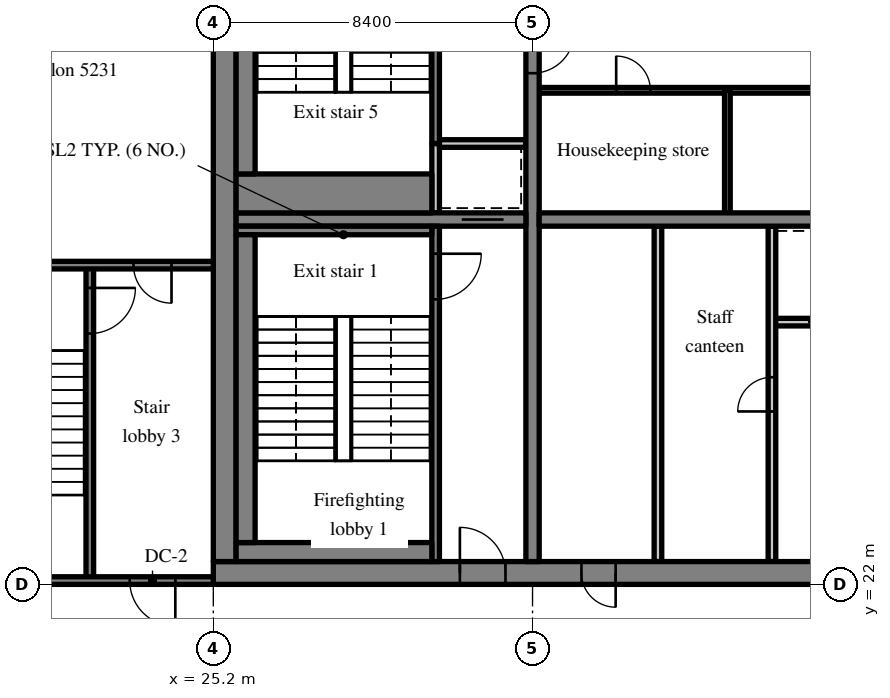
"""IFC4 building model, lengths in metres.
Left out: names, types, materials, properties, quantities, classifications, styles, units other than length and angle.
Written with IfcOpenShell. Run it as: python <this file> out.ifc"""

import sys

from ifc_helpers import new_model, si_unit, direction, frame, frame_2d, origin, place, context, subcontext, project, spatial, rectangle, extrude, source, transform, mapped, element, fill, save


model = new_model("IFC4")
c1 = context("Model", 3, precision=1e-05, world=origin(), true_north=direction((0.0, 1.0)))
c2 = subcontext(c1, "Body", "Model", "MODEL_VIEW")
j1 = project(units=[si_unit("LENGTHUNIT", "METRE"), si_unit("PLANEANGLEUNIT", "RADIAN")], contexts=[c1])
p1 = place(None, origin())
s1 = spatial("IfcSite", under=j1, at=p1, CompositionType="ELEMENT")
p2 = place(p1, origin())
s2 = spatial("IfcBuilding", under=s1, at=p2, CompositionType="ELEMENT")
p3 = place(p2, frame((0.0, 0.0, 217.9)))
s3 = spatial("IfcBuildingStorey", under=s2, at=p3, CompositionType="ELEMENT", Elevation=217.9)
m1 = source(origin(), c2, "Body", "SweptSolid", [
    extrude(rectangle(XDim=50.4, YDim=0.6, at=frame_2d((25.2, 0.0))), origin(), (0.0, 0.0, 1.0), 3.62),
])
p4 = place(p3, frame((25.2, 22.3, 0.0), z_axis=(0.0, 0.0, 1.0), x_axis=(1.0, 0.0, 0.0)))
e1 = element("IfcWall", 1, at=p4, inside=s3, PredefinedType="SHEAR", context=c2, shape_type="MappedRepresentation", body=[
    mapped(m1, transform((0.0, 0.0, 0.0), scale=1.0)),
])
m2 = source(origin(), c2, "Body", "SweptSolid", [
    extrude(rectangle(XDim=1.8, YDim=2.1, at=frame_2d((0.9, 1.05))), frame((0.0, 0.31, 0.0), z_axis=(0.0, -1.0, 0.0), x_axis=(1.0, 0.0, 0.0)), (0.0, 0.0, 1.0), 0.62),
])
p5 = place(p4, frame((15.9, 0.0, 0.0)))
e2 = element("IfcOpeningElement", 2, at=p5, cuts=e1, PredefinedType="OPENING", context=c2, shape_type="MappedRepresentation", body=[
    mapped(m2, transform((0.0, 0.0, 0.0), scale=1.0)),
])
m3 = source(origin(), c2, "Body", "SweptSolid", [
    extrude(rectangle(XDim=0.9, YDim=2.1, at=frame_2d((0.45, 1.05))), frame((0.0, 0.31, 0.0), z_axis=(0.0, -1.0, 0.0), x_axis=(1.0, 0.0, 0.0)), (0.0, 0.0, 1.0), 0.62),
])
p6 = place(p4, frame((9.687, 0.0, 0.0)))
e3 = element("IfcOpeningElement", 3, at=p6, cuts=e1, PredefinedType="OPENING", context=c2, shape_type="MappedRepresentation", body=[
    mapped(m3, transform((0.0, 0.0, 0.0), scale=1.0)),
])
p7 = place(p4, frame((21.513, 0.0, 0.0)))
e4 = element("IfcOpeningElement", 4, at=p7, cuts=e1, PredefinedType="OPENING", context=c2, shape_type="MappedRepresentation", body=[
    mapped(m3, transform((0.0, 0.0, 0.0), scale=1.0)),
])
p8 = place(p4, frame((32.7, 0.0, 0.0)))
e5 = element("IfcOpeningElement", 5, at=p8, cuts=e1, PredefinedType="OPENING", context=c2, shape_type="MappedRepresentation", body=[
    mapped(m2, transform((0.0, 0.0, 0.0), scale=1.0)),
])
m4 = source(origin(), c2, "Body", "SweptSolid", [
    extrude(rectangle(XDim=1.2, YDim=2.1, at=frame_2d((0.6, 1.05))), frame((0.0, 0.31, 0.0), z_axis=(0.0, -1.0, 0.0), x_axis=(1.0, 0.0, 0.0)), (0.0, 0.0, 1.0), 0.62),
])
p9 = place(p4, frame((6.488, 0.0, 0.0)))
e6 = element("IfcOpeningElement", 6, at=p9, cuts=e1, PredefinedType="OPENING", context=c2, shape_type="MappedRepresentation", body=[
    mapped(m4, transform((0.0, 0.0, 0.0), scale=1.0)),
])
p10 = place(p4, frame((47.925, 0.0, 0.0)))
e7 = element("IfcOpeningElement", 7, at=p10, cuts=e1, PredefinedType="OPENING", context=c2, shape_type="MappedRepresentation", body=[
    mapped(m4, transform((0.0, 0.0, 0.0), scale=1.0)),
])
m5 = source(origin(), c2, "Body", "SweptSolid", [
    extrude(rectangle(XDim=18.8, YDim=0.6, at=frame_2d((9.4, 0.0))), origin(), (0.0, 0.0, 1.0), 3.62),
])
p11 = place(p3, frame((25.5, 22.6, 0.0), z_axis=(0.0, 0.0, 1.0), x_axis=(0.0, 1.0, 0.0)))
e8 = element("IfcWall", 8, at=p11, inside=s3, PredefinedType="SHEAR", context=c2, shape_type="MappedRepresentation", body=[
    mapped(m5, transform((0.0, 0.0, 0.0), scale=1.0)),
])
m6 = source(origin(), c2, "Body", "SweptSolid", [
    extrude(rectangle(XDim=18.8, YDim=0.35, at=frame_2d((9.4, 0.0))), origin(), (0.0, 0.0, 1.0), 3.62),
])
p12 = place(p3, frame((33.6, 22.6, 0.0), z_axis=(0.0, 0.0, 1.0), x_axis=(0.0, 1.0, 0.0)))
e9 = element("IfcWall", 9, at=p12, inside=s3, PredefinedType="SHEAR", context=c2, shape_type="MappedRepresentation", body=[
    mapped(m6, transform((0.0, 0.0, 0.0), scale=1.0)),
])
m7 = source(origin(), c2, "Body", "SweptSolid", [
    extrude(rectangle(XDim=1.1, YDim=2.1, at=frame_2d((0.55, 1.05))), frame((0.0, 0.185, 0.0), z_axis=(0.0, -1.0, 0.0), x_axis=(1.0, 0.0, 0.0)), (0.0, 0.0, 1.0), 0.37),
])
p13 = place(p12, frame((12.85, 0.0, 0.0)))
e10 = element("IfcOpeningElement", 10, at=p13, cuts=e9, PredefinedType="OPENING", context=c2, shape_type="MappedRepresentation", body=[
    mapped(m7, transform((0.0, 0.0, 0.0), scale=1.0)),
])
m8 = source(origin(), c2, "Body", "SweptSolid", [
    extrude(rectangle(XDim=7.625, YDim=0.35, at=frame_2d((3.812, 0.0))), origin(), (0.0, 0.0, 1.0), 3.62),
])
p14 = place(p3, frame((25.8, 31.6, 0.0), z_axis=(0.0, 0.0, 1.0), x_axis=(1.0, 0.0, 0.0)))
e11 = element("IfcWall", 11, at=p14, inside=s3, PredefinedType="SHEAR", context=c2, shape_type="MappedRepresentation", body=[
    mapped(m8, transform((0.0, 0.0, 0.0), scale=1.0)),
])
p15 = place(p14, frame((5.938, 0.0, 0.0)))
e12 = element("IfcOpeningElement", 12, at=p15, cuts=e11, PredefinedType="OPENING", context=c2, shape_type="MappedRepresentation", body=[
    mapped(m7, transform((0.0, 0.0, 0.0), scale=1.0)),
])
m9 = source(origin(), c2, "Body", "SweptSolid", [
    extrude(rectangle(XDim=16.45, YDim=0.35, at=frame_2d((8.225, 0.0))), origin(), (0.0, 0.0, 1.0), 3.62),
])
p16 = place(p3, frame((33.775, 31.6, 0.0), z_axis=(0.0, 0.0, 1.0), x_axis=(1.0, 0.0, 0.0)))
e13 = element("IfcWall", 13, at=p16, inside=s3, PredefinedType="SHEAR", context=c2, shape_type="MappedRepresentation", body=[
    mapped(m9, transform((0.0, 0.0, 0.0), scale=1.0)),
])
m10 = source(origin(), c2, "Body", "SweptSolid", [
    extrude(rectangle(XDim=1.0, YDim=2.1, at=frame_2d((0.5, 1.05))), frame((0.0, 0.185, 0.0), z_axis=(0.0, -1.0, 0.0), x_axis=(1.0, 0.0, 0.0)), (0.0, 0.0, 1.0), 0.37),
])
p17 = place(p16, frame((14.837, 0.0, 0.0)))
e14 = element("IfcOpeningElement", 14, at=p17, cuts=e13, PredefinedType="OPENING", context=c2, shape_type="MappedRepresentation", body=[
    mapped(m10, transform((0.0, 0.0, 0.0), scale=1.0)),
])
m11 = source(origin(), c2, "Body", "SweptSolid", [
    extrude(rectangle(XDim=6.0, YDim=0.2, at=frame_2d((3.0, 0.0))), origin(), (0.0, 0.0, 1.0), 3.62),
])
p18 = place(p3, frame((39.9, 28.9, 0.0), z_axis=(0.0, 0.0, 1.0), x_axis=(1.0, 0.0, 0.0)))
e15 = element("IfcWall", 15, at=p18, inside=s3, PredefinedType="SOLIDWALL", context=c2, shape_type="MappedRepresentation", body=[
    mapped(m11, transform((0.0, 0.0, 0.0), scale=1.0)),
])
m12 = source(origin(), c2, "Body", "SweptSolid", [
    extrude(rectangle(XDim=1.1, YDim=2.1, at=frame_2d((0.55, 1.05))), frame((0.0, 0.11, 0.0), z_axis=(0.0, -1.0, 0.0), x_axis=(1.0, 0.0, 0.0)), (0.0, 0.0, 1.0), 0.22),
])
p19 = place(p18, frame((0.95, 0.0, 0.0)))
e16 = element("IfcOpeningElement", 16, at=p19, cuts=e15, PredefinedType="OPENING", context=c2, shape_type="MappedRepresentation", body=[
    mapped(m12, transform((0.0, 0.0, 0.0), scale=1.0)),
])
p20 = place(p18, frame((3.95, 0.0, 0.0)))
e17 = element("IfcOpeningElement", 17, at=p20, cuts=e15, PredefinedType="OPENING", context=c2, shape_type="MappedRepresentation", body=[
    mapped(m12, transform((0.0, 0.0, 0.0), scale=1.0)),
])
m13 = source(origin(), c2, "Body", "SweptSolid", [
    extrude(rectangle(XDim=8.825, YDim=0.2, at=frame_2d((4.413, 0.0))), origin(), (0.0, 0.0, 1.0), 3.62),
])
p21 = place(p3, frame((39.9, 22.6, 0.0), z_axis=(0.0, 0.0, 1.0), x_axis=(0.0, 1.0, 0.0)))
e18 = element("IfcWall", 18, at=p21, inside=s3, PredefinedType="PARTITIONING", context=c2, shape_type="MappedRepresentation", body=[
    mapped(m13, transform((0.0, 0.0, 0.0), scale=1.0)),
])
m14 = source(origin(), c2, "Body", "SweptSolid", [
    extrude(rectangle(XDim=0.9, YDim=2.1, at=frame_2d((0.45, 1.05))), frame((0.0, 0.11, 0.0), z_axis=(0.0, -1.0, 0.0), x_axis=(1.0, 0.0, 0.0)), (0.0, 0.0, 1.0), 0.22),
])
p22 = place(p21, frame((3.95, 0.0, 0.0)))
e19 = element("IfcOpeningElement", 19, at=p22, cuts=e18, PredefinedType="OPENING", context=c2, shape_type="MappedRepresentation", body=[
    mapped(m14, transform((0.0, 0.0, 0.0), scale=1.0)),
])
p23 = place(p3, frame((36.9, 22.6, 0.0), z_axis=(0.0, 0.0, 1.0), x_axis=(0.0, 1.0, 0.0)))
e20 = element("IfcWall", 20, at=p23, inside=s3, PredefinedType="PARTITIONING", context=c2, shape_type="MappedRepresentation", body=[
    mapped(m13, transform((0.0, 0.0, 0.0), scale=1.0)),
])
m15 = source(origin(), c2, "Body", "SweptSolid", [
    extrude(rectangle(XDim=14.225, YDim=0.15, at=frame_2d((7.113, 0.0))), origin(), (0.0, 0.0, 1.0), 3.62),
])
p24 = place(p3, frame((33.775, 35.0, 0.0), z_axis=(0.0, 0.0, 1.0), x_axis=(1.0, 0.0, 0.0)))
e21 = element("IfcWall", 21, at=p24, inside=s3, PredefinedType="PARTITIONING", context=c2, shape_type="MappedRepresentation", body=[
    mapped(m15, transform((0.0, 0.0, 0.0), scale=1.0)),
])
m16 = source(origin(), c2, "Body", "SweptSolid", [
    extrude(rectangle(XDim=0.9, YDim=2.1, at=frame_2d((0.45, 1.05))), frame((0.0, 0.085, 0.0), z_axis=(0.0, -1.0, 0.0), x_axis=(1.0, 0.0, 0.0)), (0.0, 0.0, 1.0), 0.17),
])
p25 = place(p24, frame((2.026, 0.0, 0.0)))
e22 = element("IfcOpeningElement", 22, at=p25, cuts=e21, PredefinedType="OPENING", context=c2, shape_type="MappedRepresentation", body=[
    mapped(m16, transform((0.0, 0.0, 0.0), scale=1.0)),
])
p26 = place(p24, frame((9.101, 0.0, 0.0)))
e23 = element("IfcOpeningElement", 23, at=p26, cuts=e21, PredefinedType="OPENING", context=c2, shape_type="MappedRepresentation", body=[
    mapped(m16, transform((0.0, 0.0, 0.0), scale=1.0)),
])
m17 = source(origin(), c2, "Body", "SweptSolid", [
    extrude(rectangle(XDim=3.225, YDim=0.15, at=frame_2d((1.613, 0.0))), origin(), (0.0, 0.0, 1.0), 3.62),
])
p27 = place(p3, frame((38.727, 31.775, 0.0), z_axis=(0.0, 0.0, 1.0), x_axis=(0.0, 1.0, 0.0)))
e24 = element("IfcWall", 24, at=p27, inside=s3, PredefinedType="PARTITIONING", context=c2, shape_type="MappedRepresentation", body=[
    mapped(m17, transform((0.0, 0.0, 0.0), scale=1.0)),
])
m18 = source(origin(), c2, "Body", "SweptSolid", [
    extrude(rectangle(XDim=8.825, YDim=0.2, at=frame_2d((4.413, 0.0))), origin(), (0.0, 0.0, 1.0), 3.62),
])
p28 = place(p3, frame((31.05, 22.6, 0.0), z_axis=(0.0, 0.0, 1.0), x_axis=(0.0, 1.0, 0.0)))
e25 = element("IfcWall", 25, at=p28, inside=s3, PredefinedType="SOLIDWALL", context=c2, shape_type="MappedRepresentation", body=[
    mapped(m18, transform((0.0, 0.0, 0.0), scale=1.0)),
])
m19 = source(origin(), c2, "Body", "SweptSolid", [
    extrude(rectangle(XDim=1.2, YDim=2.1, at=frame_2d((0.6, 1.05))), frame((0.0, 0.11, 0.0), z_axis=(0.0, -1.0, 0.0), x_axis=(1.0, 0.0, 0.0)), (0.0, 0.0, 1.0), 0.22),
])
p29 = place(p28, frame((6.9, 0.0, 0.0)))
e26 = element("IfcOpeningElement", 26, at=p29, cuts=e25, PredefinedType="OPENING", context=c2, shape_type="MappedRepresentation", body=[
    mapped(m19, transform((0.0, 0.0, 0.0), scale=1.0)),
])
m20 = source(origin(), c2, "Body", "SweptSolid", [
    extrude(rectangle(XDim=1.825, YDim=0.2, at=frame_2d((0.913, 0.0))), origin(), (0.0, 0.0, 1.0), 3.62),
])
p30 = place(p3, frame((31.05, 31.775, 0.0), z_axis=(0.0, 0.0, 1.0), x_axis=(0.0, 1.0, 0.0)))
e27 = element("IfcWall", 27, at=p30, inside=s3, PredefinedType="SOLIDWALL", context=c2, shape_type="MappedRepresentation", body=[
    mapped(m20, transform((0.0, 0.0, 0.0), scale=1.0)),
])
m21 = source(origin(), c2, "Body", "SweptSolid", [
    extrude(rectangle(XDim=2.275, YDim=0.2, at=frame_2d((1.138, 0.0))), origin(), (0.0, 0.0, 1.0), 3.62),
])
p31 = place(p3, frame((31.15, 33.6, 0.0), z_axis=(0.0, 0.0, 1.0), x_axis=(1.0, 0.0, 0.0)))
e28 = element("IfcWall", 28, at=p31, inside=s3, PredefinedType="SOLIDWALL", context=c2, shape_type="MappedRepresentation", body=[
    mapped(m21, transform((0.0, 0.0, 0.0), scale=1.0)),
])
m22 = source(origin(), c2, "Body", "SweptSolid", [
    extrude(rectangle(XDim=7.8, YDim=0.2, at=frame_2d((3.9, 0.0))), origin(), (0.0, 0.0, 1.0), 3.62),
])
p32 = place(p3, frame((31.05, 33.6, 0.0), z_axis=(0.0, 0.0, 1.0), x_axis=(0.0, 1.0, 0.0)))
e29 = element("IfcWall", 29, at=p32, inside=s3, PredefinedType="SOLIDWALL", context=c2, shape_type="MappedRepresentation", body=[
    mapped(m22, transform((0.0, 0.0, 0.0), scale=1.0)),
])
m23 = source(origin(), c2, "Body", "SweptSolid", [
    extrude(rectangle(XDim=1.8, YDim=2.1, at=frame_2d((0.9, 1.05))), frame((0.0, 0.11, 0.0), z_axis=(0.0, -1.0, 0.0), x_axis=(1.0, 0.0, 0.0)), (0.0, 0.0, 1.0), 0.22),
])
p33 = place(p32, frame((5.3, 0.0, 0.0)))
e30 = element("IfcOpeningElement", 30, at=p33, cuts=e29, PredefinedType="OPENING", context=c2, shape_type="MappedRepresentation", body=[
    mapped(m23, transform((0.0, 0.0, 0.0), scale=1.0)),
])
m24 = source(origin(), c2, "Body", "SweptSolid", [
    extrude(rectangle(XDim=8.3, YDim=0.2, at=frame_2d((4.15, 0.0))), origin(), (0.0, 0.0, 1.0), 3.62),
])
p34 = place(p3, frame((21.95, 22.1, 0.0), z_axis=(0.0, 0.0, 1.0), x_axis=(0.0, 1.0, 0.0)))
e31 = element("IfcWall", 31, at=p34, inside=s3, PredefinedType="SOLIDWALL", context=c2, shape_type="MappedRepresentation", body=[
    mapped(m24, transform((0.0, 0.0, 0.0), scale=1.0)),
])
p35 = place(p34, frame((6.5, 0.0, 0.0)))
e32 = element("IfcOpeningElement", 32, at=p35, cuts=e31, PredefinedType="OPENING", context=c2, shape_type="MappedRepresentation", body=[
    mapped(m19, transform((0.0, 0.0, 0.0), scale=1.0)),
])
m25 = source(origin(), c2, "Body", "SweptSolid", [
    extrude(rectangle(XDim=8.1, YDim=0.2, at=frame_2d((4.05, 0.0))), origin(), (0.0, 0.0, 1.0), 3.62),
])
p36 = place(p3, frame((17.1, 22.1, 0.0), z_axis=(0.0, 0.0, 1.0), x_axis=(1.0, 0.0, 0.0)))
e33 = element("IfcWall", 33, at=p36, inside=s3, PredefinedType="SOLIDWALL", context=c2, shape_type="MappedRepresentation", body=[
    mapped(m25, transform((0.0, 0.0, 0.0), scale=1.0)),
])
p37 = place(p36, frame((5.9, 0.0, 0.0)))
e34 = element("IfcOpeningElement", 34, at=p37, cuts=e33, PredefinedType="OPENING", context=c2, shape_type="MappedRepresentation", body=[
    mapped(m19, transform((0.0, 0.0, 0.0), scale=1.0)),
])
p38 = place(p3, frame((17.1, 30.4, 0.0), z_axis=(0.0, 0.0, 1.0), x_axis=(1.0, 0.0, 0.0)))
e35 = element("IfcWall", 35, at=p38, inside=s3, PredefinedType="SOLIDWALL", context=c2, shape_type="MappedRepresentation", body=[
    mapped(m25, transform((0.0, 0.0, 0.0), scale=1.0)),
])
m26 = source(origin(), c2, "Body", "SweptSolid", [
    extrude(rectangle(XDim=1.0, YDim=2.1, at=frame_2d((0.5, 1.05))), frame((0.0, 0.11, 0.0), z_axis=(0.0, -1.0, 0.0), x_axis=(1.0, 0.0, 0.0)), (0.0, 0.0, 1.0), 0.22),
])
p39 = place(p38, frame((6.0, 0.0, 0.0)))
e36 = element("IfcOpeningElement", 36, at=p39, cuts=e35, PredefinedType="OPENING", context=c2, shape_type="MappedRepresentation", body=[
    mapped(m26, transform((0.0, 0.0, 0.0), scale=1.0)),
])
m27 = source(origin(), c2, "Body", "SweptSolid", [
    extrude(rectangle(XDim=5.15, YDim=0.5, at=frame_2d((2.575, 0.0))), origin(), (0.0, 0.0, 1.0), 3.62),
])
p40 = place(p3, frame((25.8, 22.85, 0.0), z_axis=(0.0, 0.0, 1.0), x_axis=(1.0, 0.0, 0.0)))
e37 = element("IfcWall", 37, at=p40, inside=s3, PredefinedType="SOLIDWALL", context=c2, shape_type="MappedRepresentation", body=[
    mapped(m27, transform((0.0, 0.0, 0.0), scale=1.0)),
])
m28 = source(origin(), c2, "Body", "SweptSolid", [
    extrude(rectangle(XDim=5.15, YDim=0.225, at=frame_2d((2.575, 0.0))), origin(), (0.0, 0.0, 1.0), 3.62),
])
p41 = place(p3, frame((25.8, 31.312, 0.0), z_axis=(0.0, 0.0, 1.0), x_axis=(1.0, 0.0, 0.0)))
e38 = element("IfcWall", 38, at=p41, inside=s3, PredefinedType="SOLIDWALL", context=c2, shape_type="MappedRepresentation", body=[
    mapped(m28, transform((0.0, 0.0, 0.0), scale=1.0)),
])
m29 = source(origin(), c2, "Body", "SweptSolid", [
    extrude(rectangle(XDim=8.1, YDim=0.5, at=frame_2d((4.05, 0.0))), origin(), (0.0, 0.0, 1.0), 3.62),
])
p42 = place(p3, frame((26.05, 23.1, 0.0), z_axis=(0.0, 0.0, 1.0), x_axis=(0.0, 1.0, 0.0)))
e39 = element("IfcWall", 39, at=p42, inside=s3, PredefinedType="SOLIDWALL", context=c2, shape_type="MappedRepresentation", body=[
    mapped(m29, transform((0.0, 0.0, 0.0), scale=1.0)),
])
m30 = source(origin(), c2, "Body", "SweptSolid", [
    extrude(rectangle(XDim=5.15, YDim=1.025, at=frame_2d((2.575, 0.0))), origin(), (0.0, 0.0, 1.0), 3.62),
])
p43 = place(p3, frame((25.8, 32.287, 0.0), z_axis=(0.0, 0.0, 1.0), x_axis=(1.0, 0.0, 0.0)))
e40 = element("IfcWall", 40, at=p43, inside=s3, PredefinedType="SOLIDWALL", context=c2, shape_type="MappedRepresentation", body=[
    mapped(m30, transform((0.0, 0.0, 0.0), scale=1.0)),
])
p44 = place(p3, frame((26.05, 32.8, 0.0), z_axis=(0.0, 0.0, 1.0), x_axis=(0.0, 1.0, 0.0)))
e41 = element("IfcWall", 41, at=p44, inside=s3, PredefinedType="SOLIDWALL", context=c2, shape_type="MappedRepresentation", body=[
    mapped(m29, transform((0.0, 0.0, 0.0), scale=1.0)),
])
m31 = source(origin(), c2, "Body", "SweptSolid", [
    extrude(rectangle(XDim=1.1, YDim=2.1, at=frame_2d((0.55, 1.05))), frame((0.0, 0.025, 0.0), z_axis=(0.0, -1.0, 0.0), x_axis=(1.0, 0.0, 0.0)), (0.0, 0.0, 1.0), 0.05),
])
p45 = place(p19, origin())
e42 = element("IfcDoor", 42, at=p45, inside=s3, OperationType="SLIDING_TO_LEFT", PredefinedType="DOOR", context=c2, shape_type="MappedRepresentation", body=[
    mapped(m31, transform((0.0, 0.0, 0.0), scale=1.0)),
])
fill(e16, e42)
m32 = source(origin(), c2, "Body", "SweptSolid", [
    extrude(rectangle(XDim=0.9, YDim=2.1, at=frame_2d((0.45, 1.05))), frame((0.0, 0.225, 0.0), z_axis=(0.0, -1.0, 0.0), x_axis=(1.0, 0.0, 0.0)), (0.0, 0.0, 1.0), 0.05),
])
p46 = place(p6, origin())
e43 = element("IfcDoor", 43, at=p46, inside=s3, OperationType="SINGLE_SWING_RIGHT", PredefinedType="DOOR", context=c2, shape_type="MappedRepresentation", body=[
    mapped(m32, transform((0.0, 0.0, 0.0), scale=1.0)),
])
fill(e3, e43)
m33 = source(origin(), c2, "Body", "SweptSolid", [
    extrude(rectangle(XDim=0.9, YDim=2.1, at=frame_2d((0.45, 1.05))), frame((0.0, 0.025, 0.0), z_axis=(0.0, -1.0, 0.0), x_axis=(1.0, 0.0, 0.0)), (0.0, 0.0, 1.0), 0.05),
])
p47 = place(p22, origin())
e44 = element("IfcDoor", 44, at=p47, inside=s3, OperationType="SINGLE_SWING_LEFT", PredefinedType="DOOR", context=c2, shape_type="MappedRepresentation", body=[
    mapped(m33, transform((0.0, 0.0, 0.0), scale=1.0)),
])
fill(e19, e44)
p48 = place(p25, origin())
e45 = element("IfcDoor", 45, at=p48, inside=s3, OperationType="SINGLE_SWING_LEFT", PredefinedType="DOOR", context=c2, shape_type="MappedRepresentation", body=[
    mapped(m33, transform((0.0, 0.0, 0.0), scale=1.0)),
])
fill(e22, e45)
m34 = source(origin(), c2, "Body", "SweptSolid", [
    extrude(rectangle(XDim=1.2, YDim=2.1, at=frame_2d((0.6, 1.05))), frame((0.0, 0.025, 0.0), z_axis=(0.0, -1.0, 0.0), x_axis=(1.0, 0.0, 0.0)), (0.0, 0.0, 1.0), 0.05),
])
p49 = place(p29, origin())
e46 = element("IfcDoor", 46, at=p49, inside=s3, OperationType="SINGLE_SWING_RIGHT", PredefinedType="DOOR", context=c2, shape_type="MappedRepresentation", body=[
    mapped(m34, transform((0.0, 0.0, 0.0), scale=1.0)),
])
fill(e26, e46)
m35 = source(origin(), c2, "Body", "SweptSolid", [
    extrude(rectangle(XDim=1.2, YDim=2.1, at=frame_2d((0.6, 1.05))), frame((0.0, 0.225, 0.0), z_axis=(0.0, -1.0, 0.0), x_axis=(1.0, 0.0, 0.0)), (0.0, 0.0, 1.0), 0.05),
])
p50 = place(p9, origin())
e47 = element("IfcDoor", 47, at=p50, inside=s3, OperationType="SINGLE_SWING_LEFT", PredefinedType="DOOR", context=c2, shape_type="MappedRepresentation", body=[
    mapped(m35, transform((0.0, 0.0, 0.0), scale=1.0)),
])
fill(e6, e47)
p51 = place(p15, origin())
e48 = element("IfcDoor", 48, at=p51, inside=s3, OperationType="SLIDING_TO_LEFT", PredefinedType="DOOR", context=c2, shape_type="MappedRepresentation", body=[
    mapped(m31, transform((0.0, 0.0, 0.0), scale=1.0)),
])
fill(e12, e48)
p52 = place(p35, origin())
e49 = element("IfcDoor", 49, at=p52, inside=s3, OperationType="SINGLE_SWING_RIGHT", PredefinedType="DOOR", context=c2, shape_type="MappedRepresentation", body=[
    mapped(m34, transform((0.0, 0.0, 0.0), scale=1.0)),
])
fill(e32, e49)
p53 = place(p37, origin())
e50 = element("IfcDoor", 50, at=p53, inside=s3, OperationType="SINGLE_SWING_RIGHT", PredefinedType="DOOR", context=c2, shape_type="MappedRepresentation", body=[
    mapped(m34, transform((0.0, 0.0, 0.0), scale=1.0)),
])
fill(e34, e50)
m36 = source(origin(), c2, "Body", "SweptSolid", [
    extrude(rectangle(XDim=1.0, YDim=2.1, at=frame_2d((0.5, 1.05))), frame((0.0, 0.025, 0.0), z_axis=(0.0, -1.0, 0.0), x_axis=(1.0, 0.0, 0.0)), (0.0, 0.0, 1.0), 0.05),
])
p54 = place(p39, origin())
e51 = element("IfcDoor", 51, at=p54, inside=s3, OperationType="SINGLE_SWING_RIGHT", PredefinedType="DOOR", context=c2, shape_type="MappedRepresentation", body=[
    mapped(m36, transform((0.0, 0.0, 0.0), scale=1.0)),
])
fill(e36, e51)
p55 = place(p13, origin())
e52 = element("IfcDoor", 52, at=p55, inside=s3, OperationType="SINGLE_SWING_RIGHT", PredefinedType="DOOR", context=c2, shape_type="MappedRepresentation", body=[
    mapped(m31, transform((0.0, 0.0, 0.0), scale=1.0)),
])
fill(e10, e52)
save(model, sys.argv[1])
